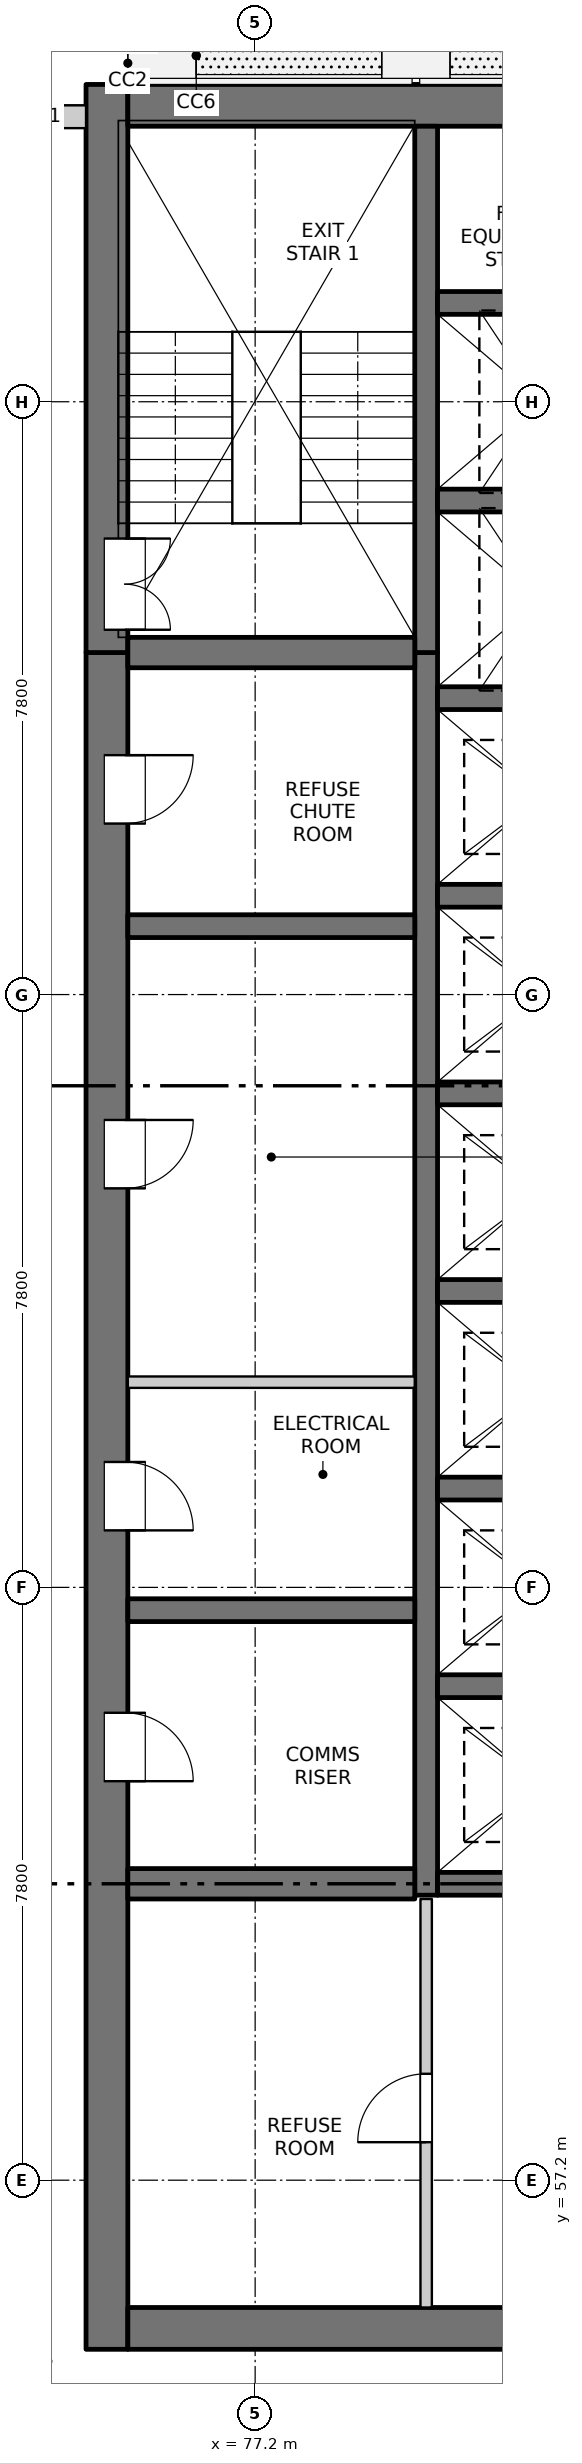
"""IFC4 building model, lengths in metres.
Left out: names, types, materials, properties, quantities, classifications, styles, units other than length and angle.
Written with IfcOpenShell. Run it as: python <this file> out.ifc"""

import sys

from ifc_helpers import new_model, si_unit, direction, frame, frame_2d, origin, place, context, subcontext, project, spatial, rectangle, extrude, element, fill, save


model = new_model("IFC4")
c1 = context("Model", 3, precision=1e-05, world=origin(), true_north=direction((0.0, 1.0)))
c2 = subcontext(c1, "Body", "Model", "MODEL_VIEW")
j1 = project(units=[si_unit("LENGTHUNIT", "METRE"), si_unit("PLANEANGLEUNIT", "RADIAN")], contexts=[c1])
p1 = place(None, origin())
s1 = spatial("IfcSite", under=j1, at=p1, CompositionType="ELEMENT")
p2 = place(p1, origin())
s2 = spatial("IfcBuilding", under=s1, at=p2, CompositionType="ELEMENT")
p3 = place(p2, frame((0.0, 0.0, 113.5)))
s3 = spatial("IfcBuildingStorey", under=s2, at=p3, CompositionType="ELEMENT", Elevation=113.5)
p4 = place(p3, frame((75.25, 54.975, -0.25), z_axis=(0.0, 0.0, 1.0), x_axis=(0.0, 1.0, 0.0)))
e1 = element("IfcWall", 1, at=p4, inside=s3, PredefinedType="SOLIDWALL", context=c2, shape_type="SweptSolid", body=[
    extrude(rectangle(XDim=22.325, YDim=0.55, at=frame_2d((11.163, 0.0))), origin(), (0.0, 0.0, 1.0), 3.35),
])
p5 = place(p4, frame((7.475, 0.0, 0.25)))
e2 = element("IfcOpeningElement", 2, at=p5, cuts=e1, PredefinedType="OPENING", context=c2, shape_type="SweptSolid", body=[
    extrude(rectangle(XDim=0.9, YDim=2.1, at=frame_2d((0.45, 1.05))), frame((0.0, 0.285, 0.0), z_axis=(0.0, -1.0, 0.0), x_axis=(1.0, 0.0, 0.0)), (0.0, 0.0, 1.0), 0.57),
])
p6 = place(p4, frame((10.775, 0.0, 0.25)))
e3 = element("IfcOpeningElement", 3, at=p6, cuts=e1, PredefinedType="OPENING", context=c2, shape_type="SweptSolid", body=[
    extrude(rectangle(XDim=0.9, YDim=2.1, at=frame_2d((0.45, 1.05))), frame((0.0, 0.285, 0.0), z_axis=(0.0, -1.0, 0.0), x_axis=(1.0, 0.0, 0.0)), (0.0, 0.0, 1.0), 0.57),
])
p7 = place(p4, frame((15.275, 0.0, 0.25)))
e4 = element("IfcOpeningElement", 4, at=p7, cuts=e1, PredefinedType="OPENING", context=c2, shape_type="SweptSolid", body=[
    extrude(rectangle(XDim=0.9, YDim=2.1, at=frame_2d((0.45, 1.05))), frame((0.0, 0.285, 0.0), z_axis=(0.0, -1.0, 0.0), x_axis=(1.0, 0.0, 0.0)), (0.0, 0.0, 1.0), 0.57),
])
p8 = place(p4, frame((20.075, 0.0, 0.25)))
e5 = element("IfcOpeningElement", 5, at=p8, cuts=e1, PredefinedType="OPENING", context=c2, shape_type="SweptSolid", body=[
    extrude(rectangle(XDim=0.9, YDim=2.1, at=frame_2d((0.45, 1.05))), frame((0.0, 0.285, 0.0), z_axis=(0.0, -1.0, 0.0), x_axis=(1.0, 0.0, 0.0)), (0.0, 0.0, 1.0), 0.57),
])
p9 = place(p3, frame((75.25, 77.3, -0.25), z_axis=(0.0, 0.0, 1.0), x_axis=(0.0, 1.0, 0.0)))
e6 = element("IfcWall", 6, at=p9, inside=s3, PredefinedType="SOLIDWALL", context=c2, shape_type="SweptSolid", body=[
    extrude(rectangle(XDim=7.475, YDim=0.55, at=frame_2d((3.737, 0.0))), origin(), (0.0, 0.0, 1.0), 3.35),
])
p10 = place(p9, frame((0.3, 0.0, 0.25)))
e7 = element("IfcOpeningElement", 7, at=p10, cuts=e6, PredefinedType="OPENING", context=c2, shape_type="SweptSolid", body=[
    extrude(rectangle(XDim=1.2, YDim=2.1, at=frame_2d((0.6, 1.05))), frame((0.0, 0.285, 0.0), z_axis=(0.0, -1.0, 0.0), x_axis=(1.0, 0.0, 0.0)), (0.0, 0.0, 1.0), 0.57),
])
p11 = place(p3, frame((75.525, 55.25, -0.25), z_axis=(0.0, 0.0, 1.0), x_axis=(1.0, 0.0, 0.0)))
e8 = element("IfcWall", 8, at=p11, inside=s3, PredefinedType="SOLIDWALL", context=c2, shape_type="SweptSolid", body=[
    extrude(rectangle(XDim=18.95, YDim=0.55, at=frame_2d((9.475, 0.0))), origin(), (0.0, 0.0, 1.0), 3.35),
])
p12 = place(p11, frame((8.725, 0.0, 0.25)))
e9 = element("IfcOpeningElement", 9, at=p12, cuts=e8, PredefinedType="OPENING", context=c2, shape_type="SweptSolid", body=[
    extrude(rectangle(XDim=1.5, YDim=2.1, at=frame_2d((0.75, 1.05))), frame((0.0, 0.285, 0.0), z_axis=(0.0, -1.0, 0.0), x_axis=(1.0, 0.0, 0.0)), (0.0, 0.0, 1.0), 0.57),
])
p13 = place(p3, frame((75.525, 84.5, -0.25), z_axis=(0.0, 0.0, 1.0), x_axis=(1.0, 0.0, 0.0)))
e10 = element("IfcWall", 10, at=p13, inside=s3, PredefinedType="SOLIDWALL", context=c2, shape_type="SweptSolid", body=[
    extrude(rectangle(XDim=18.95, YDim=0.55, at=frame_2d((9.475, 0.0))), origin(), (0.0, 0.0, 1.0), 3.35),
])
p14 = place(p3, frame((79.45, 60.95, -0.25), z_axis=(0.0, 0.0, 1.0), x_axis=(0.0, 1.0, 0.0)))
e11 = element("IfcWall", 11, at=p14, inside=s3, PredefinedType="SOLIDWALL", context=c2, shape_type="SweptSolid", body=[
    extrude(rectangle(XDim=16.35, YDim=0.3, at=frame_2d((8.175, 0.0))), origin(), (0.0, 0.0, 1.0), 3.35),
])
p15 = place(p3, frame((79.45, 77.3, -0.25), z_axis=(0.0, 0.0, 1.0), x_axis=(0.0, 1.0, 0.0)))
e12 = element("IfcWall", 12, at=p15, inside=s3, PredefinedType="SOLIDWALL", context=c2, shape_type="SweptSolid", body=[
    extrude(rectangle(XDim=6.925, YDim=0.3, at=frame_2d((3.462, 0.0))), origin(), (0.0, 0.0, 1.0), 3.35),
])
for number, where, z_axis, x_axis in (
    (13, (79.6, 61.1, -0.25), (0.0, 0.0, 1.0), (1.0, 0.0, 0.0)),
    (14, (79.6, 63.7, -0.25), (0.0, 0.0, 1.0), (1.0, 0.0, 0.0)),
    (15, (79.6, 66.3, -0.25), (0.0, 0.0, 1.0), (1.0, 0.0, 0.0)),
    (16, (79.6, 68.9, -0.25), (0.0, 0.0, 1.0), (1.0, 0.0, 0.0)),
    (17, (79.6, 71.5, -0.25), (0.0, 0.0, 1.0), (1.0, 0.0, 0.0)),
    (18, (79.6, 74.1, -0.25), (0.0, 0.0, 1.0), (1.0, 0.0, 0.0)),
    (19, (79.6, 76.7, -0.25), (0.0, 0.0, 1.0), (1.0, 0.0, 0.0)),
    (20, (79.6, 79.3, -0.25), (0.0, 0.0, 1.0), (1.0, 0.0, 0.0)),
    (21, (79.6, 81.9, -0.25), (0.0, 0.0, 1.0), (1.0, 0.0, 0.0)),
):
    element("IfcWall", number, at=place(p3, frame(where, z_axis=z_axis, x_axis=x_axis)), inside=s3, PredefinedType="SOLIDWALL", context=c2, shape_type="SweptSolid", body=[
        extrude(rectangle(XDim=3.0, YDim=0.3, at=frame_2d((1.5, 0.0))), origin(), (0.0, 0.0, 1.0), 3.35),
    ])
p16 = place(p3, frame((75.525, 61.1, -0.25), z_axis=(0.0, 0.0, 1.0), x_axis=(1.0, 0.0, 0.0)))
e22 = element("IfcWall", 22, at=p16, inside=s3, PredefinedType="SOLIDWALL", context=c2, shape_type="SweptSolid", body=[
    extrude(rectangle(XDim=3.775, YDim=0.4, at=frame_2d((1.888, 0.0))), origin(), (0.0, 0.0, 1.0), 3.35),
])
for number, where, z_axis, x_axis in (
    (23, (75.525, 64.7, -0.25), (0.0, 0.0, 1.0), (1.0, 0.0, 0.0)),
    (24, (75.525, 73.7, -0.25), (0.0, 0.0, 1.0), (1.0, 0.0, 0.0)),
):
    element("IfcWall", number, at=place(p3, frame(where, z_axis=z_axis, x_axis=x_axis)), inside=s3, PredefinedType="SOLIDWALL", context=c2, shape_type="SweptSolid", body=[
        extrude(rectangle(XDim=3.775, YDim=0.3, at=frame_2d((1.888, 0.0))), origin(), (0.0, 0.0, 1.0), 3.35),
    ])
p17 = place(p3, frame((75.525, 77.3, -0.25), z_axis=(0.0, 0.0, 1.0), x_axis=(1.0, 0.0, 0.0)))
e25 = element("IfcWall", 25, at=p17, inside=s3, PredefinedType="SOLIDWALL", context=c2, shape_type="SweptSolid", body=[
    extrude(rectangle(XDim=3.775, YDim=0.4, at=frame_2d((1.888, 0.0))), origin(), (0.0, 0.0, 1.0), 3.35),
])
p18 = place(p3, frame((73.725, 84.35, 0.0), z_axis=(0.0, 0.0, 1.0), x_axis=(1.0, 0.0, 0.0)))
e26 = element("IfcWall", 26, at=p18, inside=s3, PredefinedType="SOLIDWALL", context=c2, shape_type="SweptSolid", body=[
    extrude(rectangle(XDim=1.25, YDim=0.3, at=frame_2d((0.625, 0.0))), origin(), (0.0, 0.0, 1.0), 3.1),
])
p19 = place(p3, frame((75.525, 67.7, 0.0), z_axis=(0.0, 0.0, 1.0), x_axis=(1.0, 0.0, 0.0)))
e27 = element("IfcWall", 27, at=p19, inside=s3, PredefinedType="PARTITIONING", context=c2, shape_type="SweptSolid", body=[
    extrude(rectangle(XDim=3.775, YDim=0.15, at=frame_2d((1.887, 0.0))), origin(), (0.0, 0.0, 1.0), 3.1),
])
p20 = place(p3, frame((79.45, 55.525, 0.0), z_axis=(0.0, 0.0, 1.0), x_axis=(0.0, 1.0, 0.0)))
e28 = element("IfcWall", 28, at=p20, inside=s3, PredefinedType="PARTITIONING", context=c2, shape_type="SweptSolid", body=[
    extrude(rectangle(XDim=5.375, YDim=0.15, at=frame_2d((2.688, 0.0))), origin(), (0.0, 0.0, 1.0), 3.1),
])
p21 = place(p20, frame((2.175, 0.0, 0.0)))
e29 = element("IfcOpeningElement", 29, at=p21, cuts=e28, PredefinedType="OPENING", context=c2, shape_type="SweptSolid", body=[
    extrude(rectangle(XDim=0.9, YDim=2.1, at=frame_2d((0.45, 1.05))), frame((0.0, 0.085, 0.0), z_axis=(0.0, -1.0, 0.0), x_axis=(1.0, 0.0, 0.0)), (0.0, 0.0, 1.0), 0.17),
])
p22 = place(p21, origin())
e30 = element("IfcDoor", 30, at=p22, inside=s3, OperationType="SINGLE_SWING_LEFT", PredefinedType="DOOR", context=c2, shape_type="SweptSolid", body=[
    extrude(rectangle(XDim=0.9, YDim=2.1, at=frame_2d((0.45, 1.05))), frame((0.0, 0.025, 0.0), z_axis=(0.0, -1.0, 0.0), x_axis=(1.0, 0.0, 0.0)), (0.0, 0.0, 1.0), 0.05),
])
fill(e29, e30)
p23 = place(p5, origin())
e31 = element("IfcDoor", 31, at=p23, inside=s3, OperationType="SINGLE_SWING_RIGHT", PredefinedType="DOOR", context=c2, shape_type="SweptSolid", body=[
    extrude(rectangle(XDim=0.9, YDim=2.1, at=frame_2d((0.45, 1.05))), frame((0.0, -0.21, 0.0), z_axis=(0.0, -1.0, 0.0), x_axis=(1.0, 0.0, 0.0)), (0.0, 0.0, 1.0), 0.05),
])
fill(e2, e31)
p24 = place(p6, origin())
e32 = element("IfcDoor", 32, at=p24, inside=s3, OperationType="SINGLE_SWING_RIGHT", PredefinedType="DOOR", context=c2, shape_type="SweptSolid", body=[
    extrude(rectangle(XDim=0.9, YDim=2.1, at=frame_2d((0.45, 1.05))), frame((0.0, -0.21, 0.0), z_axis=(0.0, -1.0, 0.0), x_axis=(1.0, 0.0, 0.0)), (0.0, 0.0, 1.0), 0.05),
])
fill(e3, e32)
p25 = place(p7, origin())
e33 = element("IfcDoor", 33, at=p25, inside=s3, OperationType="SINGLE_SWING_LEFT", PredefinedType="DOOR", context=c2, shape_type="SweptSolid", body=[
    extrude(rectangle(XDim=0.9, YDim=2.1, at=frame_2d((0.45, 1.05))), frame((0.0, -0.21, 0.0), z_axis=(0.0, -1.0, 0.0), x_axis=(1.0, 0.0, 0.0)), (0.0, 0.0, 1.0), 0.05),
])
fill(e4, e33)
p26 = place(p8, origin())
e34 = element("IfcDoor", 34, at=p26, inside=s3, OperationType="SINGLE_SWING_LEFT", PredefinedType="DOOR", context=c2, shape_type="SweptSolid", body=[
    extrude(rectangle(XDim=0.9, YDim=2.1, at=frame_2d((0.45, 1.05))), frame((0.0, -0.21, 0.0), z_axis=(0.0, -1.0, 0.0), x_axis=(1.0, 0.0, 0.0)), (0.0, 0.0, 1.0), 0.05),
])
fill(e5, e34)
p27 = place(p10, origin())
e35 = element("IfcDoor", 35, at=p27, inside=s3, OperationType="DOUBLE_DOOR_SINGLE_SWING", PredefinedType="DOOR", context=c2, shape_type="SweptSolid", body=[
    extrude(rectangle(XDim=1.2, YDim=2.1, at=frame_2d((0.6, 1.05))), frame((0.0, -0.21, 0.0), z_axis=(0.0, -1.0, 0.0), x_axis=(1.0, 0.0, 0.0)), (0.0, 0.0, 1.0), 0.05),
])
fill(e7, e35)
save(model, sys.argv[1])
